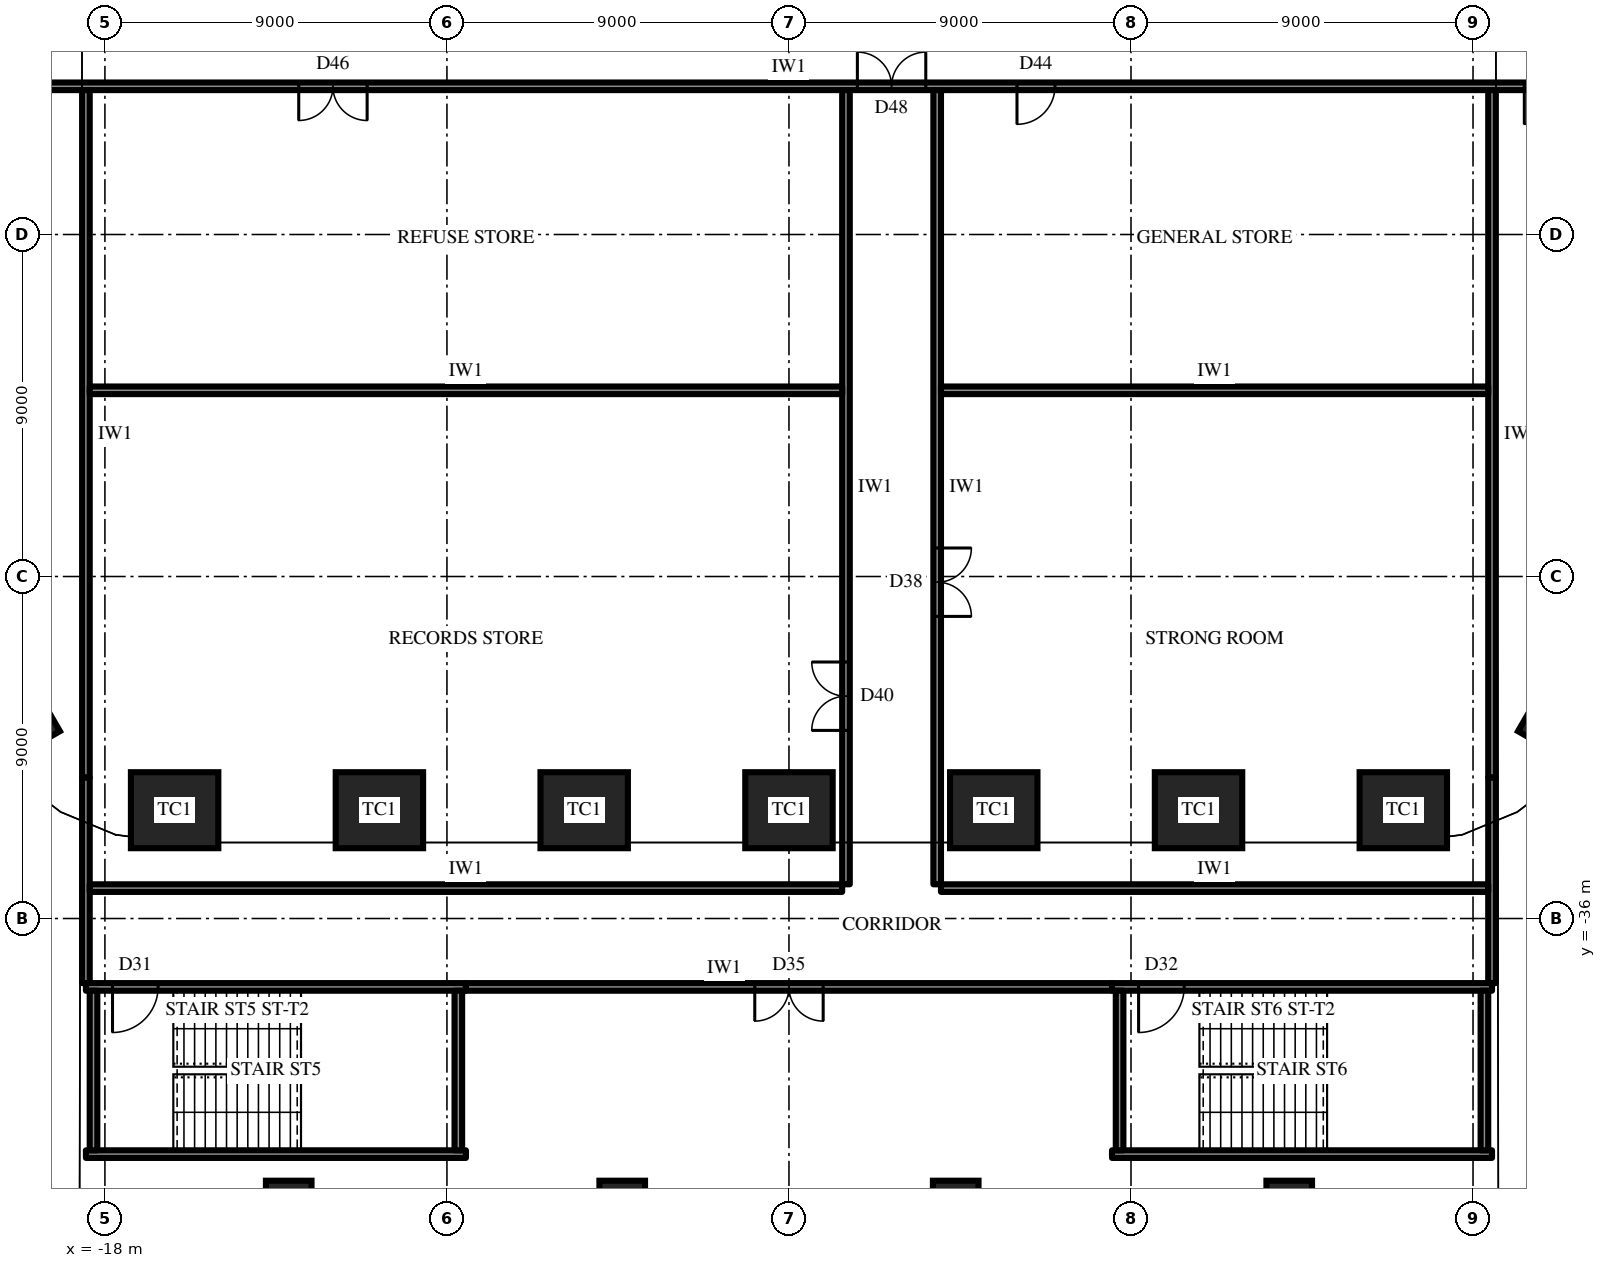
"""IFC4 building model, lengths in metres.
Left out: names, types, materials, properties, quantities, classifications, styles, units other than length and angle.
Written with IfcOpenShell. Run it as: python <this file> out.ifc"""

import sys

from ifc_helpers import new_model, si_unit, direction, frame, frame_2d, origin, origin_2d, place, context, subcontext, project, spatial, rectangle, extrude, element, fill, save


model = new_model("IFC4")
c1 = context("Model", 3, precision=1e-05, world=origin(), true_north=direction((0.0, 1.0)))
c2 = subcontext(c1, "Body", "Model", "MODEL_VIEW")
j1 = project(units=[si_unit("LENGTHUNIT", "METRE"), si_unit("PLANEANGLEUNIT", "RADIAN")], contexts=[c1])
p1 = place(None, origin())
s1 = spatial("IfcSite", under=j1, at=p1, CompositionType="ELEMENT")
p2 = place(p1, origin())
s2 = spatial("IfcBuilding", under=s1, at=p2, CompositionType="ELEMENT")
p3 = place(p2, frame((0.0, 0.0, -4.5)))
s3 = spatial("IfcBuildingStorey", under=s2, at=p3, CompositionType="ELEMENT", Elevation=-4.5)
for number, where, z_axis, x_axis in (
    (1, (-20.626, -30.575, 0.0), (0.0, 0.0, 1.0), (0.5, -0.866, 0.0)),
    (2, (-16.166, -33.15, 0.0), (0.0, 0.0, 1.0), (1.0, 0.0, 0.0)),
    (3, (-10.777, -33.15, 0.0), (0.0, 0.0, 1.0), (1.0, 0.0, 0.0)),
    (4, (-5.389, -33.15, 0.0), (0.0, 0.0, 1.0), (1.0, 0.0, 0.0)),
    (5, (0.0, -33.15, 0.0), (0.0, 0.0, 1.0), (1.0, 0.0, 0.0)),
    (6, (5.389, -33.15, 0.0), (0.0, 0.0, 1.0), (1.0, 0.0, 0.0)),
    (7, (10.777, -33.15, 0.0), (0.0, 0.0, 1.0), (1.0, 0.0, 0.0)),
    (8, (16.166, -33.15, 0.0), (0.0, 0.0, 1.0), (1.0, 0.0, 0.0)),
    (9, (20.626, -30.575, 0.0), (0.0, 0.0, 1.0), (0.5, 0.866, 0.0)),
):
    element("IfcColumn", number, at=place(p3, frame(where, z_axis=z_axis, x_axis=x_axis)), inside=s3, PredefinedType="COLUMN", context=c2, shape_type="SweptSolid", body=[
        extrude(rectangle(XDim=2.3, YDim=2.0, at=origin_2d()), origin(), (0.0, 0.0, 1.0), 4.5),
    ])
p4 = place(p3, frame((-18.5, -42.2, 0.0), z_axis=(0.0, 0.0, 1.0), x_axis=(1.0, 0.0, 0.0)))
e10 = element("IfcWall", 10, at=p4, inside=s3, PredefinedType="SHEAR", context=c2, shape_type="SweptSolid", body=[
    extrude(rectangle(XDim=10.0, YDim=0.2, at=frame_2d((5.0, 0.0))), origin(), (0.0, 0.0, 1.0), 4.5),
])
p5 = place(p3, frame((-8.5, -37.8, 0.0), z_axis=(0.0, 0.0, 1.0), x_axis=(-1.0, 0.0, 0.0)))
e11 = element("IfcWall", 11, at=p5, inside=s3, PredefinedType="SHEAR", context=c2, shape_type="SweptSolid", body=[
    extrude(rectangle(XDim=10.0, YDim=0.2, at=frame_2d((5.0, 0.0))), origin(), (0.0, 0.0, 1.0), 4.5),
])
p6 = place(p5, frame((8.1, 0.0, 0.0)))
e12 = element("IfcOpeningElement", 12, at=p6, cuts=e11, PredefinedType="OPENING", context=c2, shape_type="SweptSolid", body=[
    extrude(rectangle(XDim=1.2, YDim=2.2, at=frame_2d((0.6, 1.1))), frame((0.0, 0.11, 0.0), z_axis=(0.0, -1.0, 0.0), x_axis=(1.0, 0.0, 0.0)), (0.0, 0.0, 1.0), 0.22),
])
for number, where, z_axis, x_axis in (
    (13, (-18.3, -37.9, 0.0), (0.0, 0.0, 1.0), (0.0, -1.0, 0.0)),
    (14, (-8.7, -42.1, 0.0), (0.0, 0.0, 1.0), (0.0, 1.0, 0.0)),
):
    element("IfcWall", number, at=place(p3, frame(where, z_axis=z_axis, x_axis=x_axis)), inside=s3, PredefinedType="SHEAR", context=c2, shape_type="SweptSolid", body=[
        extrude(rectangle(XDim=4.2, YDim=0.2, at=frame_2d((2.1, 0.0))), origin(), (0.0, 0.0, 1.0), 4.5),
    ])
p7 = place(p3, frame((8.5, -42.2, 0.0), z_axis=(0.0, 0.0, 1.0), x_axis=(1.0, 0.0, 0.0)))
e15 = element("IfcWall", 15, at=p7, inside=s3, PredefinedType="SHEAR", context=c2, shape_type="SweptSolid", body=[
    extrude(rectangle(XDim=10.0, YDim=0.2, at=frame_2d((5.0, 0.0))), origin(), (0.0, 0.0, 1.0), 4.5),
])
p8 = place(p3, frame((18.5, -37.8, 0.0), z_axis=(0.0, 0.0, 1.0), x_axis=(-1.0, 0.0, 0.0)))
e16 = element("IfcWall", 16, at=p8, inside=s3, PredefinedType="SHEAR", context=c2, shape_type="SweptSolid", body=[
    extrude(rectangle(XDim=10.0, YDim=0.2, at=frame_2d((5.0, 0.0))), origin(), (0.0, 0.0, 1.0), 4.5),
])
p9 = place(p8, frame((8.1, 0.0, 0.0)))
e17 = element("IfcOpeningElement", 17, at=p9, cuts=e16, PredefinedType="OPENING", context=c2, shape_type="SweptSolid", body=[
    extrude(rectangle(XDim=1.2, YDim=2.2, at=frame_2d((0.6, 1.1))), frame((0.0, 0.11, 0.0), z_axis=(0.0, -1.0, 0.0), x_axis=(1.0, 0.0, 0.0)), (0.0, 0.0, 1.0), 0.22),
])
for number, where, z_axis, x_axis in (
    (18, (8.7, -37.9, 0.0), (0.0, 0.0, 1.0), (0.0, -1.0, 0.0)),
    (19, (18.3, -42.1, 0.0), (0.0, 0.0, 1.0), (0.0, 1.0, 0.0)),
):
    element("IfcWall", number, at=place(p3, frame(where, z_axis=z_axis, x_axis=x_axis)), inside=s3, PredefinedType="SHEAR", context=c2, shape_type="SweptSolid", body=[
        extrude(rectangle(XDim=4.2, YDim=0.2, at=frame_2d((2.1, 0.0))), origin(), (0.0, 0.0, 1.0), 4.5),
    ])
for number, where, z_axis, x_axis in (
    (20, (-13.164, -43.5, 0.0), (0.0, 0.0, 1.0), (1.0, 0.0, 0.0)),
    (21, (-4.388, -43.5, 0.0), (0.0, 0.0, 1.0), (1.0, 0.0, 0.0)),
    (22, (4.388, -43.5, 0.0), (0.0, 0.0, 1.0), (1.0, 0.0, 0.0)),
    (23, (13.164, -43.5, 0.0), (0.0, 0.0, 1.0), (1.0, 0.0, 0.0)),
):
    element("IfcColumn", number, at=place(p3, frame(where, z_axis=z_axis, x_axis=x_axis)), inside=s3, PredefinedType="COLUMN", context=c2, shape_type="SweptSolid", body=[
        extrude(rectangle(XDim=1.2, YDim=1.2, at=origin_2d()), origin(), (0.0, 0.0, 1.0), 4.5),
    ])
p10 = place(p3, frame((-44.283, -14.1, 0.0), z_axis=(0.0, 0.0, 1.0), x_axis=(1.0, 0.0, 0.0)))
e24 = element("IfcWall", 24, at=p10, inside=s3, PredefinedType="PARTITIONING", context=c2, shape_type="SweptSolid", body=[
    extrude(rectangle(XDim=88.565, YDim=0.2, at=frame_2d((44.283, 0.0))), origin(), (0.0, 0.0, 1.0), 4.15),
])
p11 = place(p10, frame((31.383, 0.0, 0.0)))
e25 = element("IfcOpeningElement", 25, at=p11, cuts=e24, PredefinedType="OPENING", context=c2, shape_type="SweptSolid", body=[
    extrude(rectangle(XDim=1.8, YDim=2.4, at=frame_2d((0.9, 1.2))), frame((0.0, 0.11, 0.0), z_axis=(0.0, -1.0, 0.0), x_axis=(1.0, 0.0, 0.0)), (0.0, 0.0, 1.0), 0.22),
])
p12 = place(p10, frame((50.283, 0.0, 0.0)))
e26 = element("IfcOpeningElement", 26, at=p12, cuts=e24, PredefinedType="OPENING", context=c2, shape_type="SweptSolid", body=[
    extrude(rectangle(XDim=1.0, YDim=2.2, at=frame_2d((0.5, 1.1))), frame((0.0, 0.11, 0.0), z_axis=(0.0, -1.0, 0.0), x_axis=(1.0, 0.0, 0.0)), (0.0, 0.0, 1.0), 0.22),
])
p13 = place(p10, frame((46.083, 0.0, 0.0)))
e27 = element("IfcOpeningElement", 27, at=p13, cuts=e24, PredefinedType="OPENING", context=c2, shape_type="SweptSolid", body=[
    extrude(rectangle(XDim=1.8, YDim=2.4, at=frame_2d((0.9, 1.2))), frame((0.0, 0.11, 0.0), z_axis=(0.0, -1.0, 0.0), x_axis=(1.0, 0.0, 0.0)), (0.0, 0.0, 1.0), 0.22),
])
p14 = place(p10, frame((63.633, 0.0, 0.0)))
e28 = element("IfcOpeningElement", 28, at=p14, cuts=e24, PredefinedType="OPENING", context=c2, shape_type="SweptSolid", body=[
    extrude(rectangle(XDim=1.0, YDim=2.2, at=frame_2d((0.5, 1.1))), frame((0.0, 0.11, 0.0), z_axis=(0.0, -1.0, 0.0), x_axis=(1.0, 0.0, 0.0)), (0.0, 0.0, 1.0), 0.22),
])
p15 = place(p3, frame((-18.5, -14.2, 0.0), z_axis=(0.0, 0.0, 1.0), x_axis=(0.0, -1.0, 0.0)))
e29 = element("IfcWall", 29, at=p15, inside=s3, PredefinedType="PARTITIONING", context=c2, shape_type="SweptSolid", body=[
    extrude(rectangle(XDim=18.09, YDim=0.2, at=frame_2d((9.045, 0.0))), origin(), (0.0, 0.0, 1.0), 3.094),
])
p16 = place(p3, frame((-18.5, -32.29, 0.0), z_axis=(0.0, 0.0, 1.0), x_axis=(0.0, -1.0, 0.0)))
e30 = element("IfcWall", 30, at=p16, inside=s3, PredefinedType="PARTITIONING", context=c2, shape_type="SweptSolid", body=[
    extrude(rectangle(XDim=5.41, YDim=0.2, at=frame_2d((2.705, 0.0))), origin(), (0.0, 0.0, 1.0), 4.15),
])
p17 = place(p3, frame((18.5, -14.2, 0.0), z_axis=(0.0, 0.0, 1.0), x_axis=(0.0, -1.0, 0.0)))
e31 = element("IfcWall", 31, at=p17, inside=s3, PredefinedType="PARTITIONING", context=c2, shape_type="SweptSolid", body=[
    extrude(rectangle(XDim=18.09, YDim=0.2, at=frame_2d((9.045, 0.0))), origin(), (0.0, 0.0, 1.0), 3.094),
])
p18 = place(p3, frame((18.5, -32.29, 0.0), z_axis=(0.0, 0.0, 1.0), x_axis=(0.0, -1.0, 0.0)))
e32 = element("IfcWall", 32, at=p18, inside=s3, PredefinedType="PARTITIONING", context=c2, shape_type="SweptSolid", body=[
    extrude(rectangle(XDim=5.41, YDim=0.2, at=frame_2d((2.705, 0.0))), origin(), (0.0, 0.0, 1.0), 4.15),
])
p19 = place(p3, frame((1.5, -14.2, 0.0), z_axis=(0.0, 0.0, 1.0), x_axis=(0.0, -1.0, 0.0)))
e33 = element("IfcWall", 33, at=p19, inside=s3, PredefinedType="PARTITIONING", context=c2, shape_type="SweptSolid", body=[
    extrude(rectangle(XDim=20.9, YDim=0.2, at=frame_2d((10.45, 0.0))), origin(), (0.0, 0.0, 1.0), 4.15),
])
p20 = place(p19, frame((15.05, 0.0, 0.0)))
e34 = element("IfcOpeningElement", 34, at=p20, cuts=e33, PredefinedType="OPENING", context=c2, shape_type="SweptSolid", body=[
    extrude(rectangle(XDim=1.8, YDim=2.4, at=frame_2d((0.9, 1.2))), frame((0.0, 0.11, 0.0), z_axis=(0.0, -1.0, 0.0), x_axis=(1.0, 0.0, 0.0)), (0.0, 0.0, 1.0), 0.22),
])
p21 = place(p3, frame((3.9, -14.2, 0.0), z_axis=(0.0, 0.0, 1.0), x_axis=(0.0, -1.0, 0.0)))
e35 = element("IfcWall", 35, at=p21, inside=s3, PredefinedType="PARTITIONING", context=c2, shape_type="SweptSolid", body=[
    extrude(rectangle(XDim=20.9, YDim=0.2, at=frame_2d((10.45, 0.0))), origin(), (0.0, 0.0, 1.0), 4.15),
])
p22 = place(p21, frame((12.05, 0.0, 0.0)))
e36 = element("IfcOpeningElement", 36, at=p22, cuts=e35, PredefinedType="OPENING", context=c2, shape_type="SweptSolid", body=[
    extrude(rectangle(XDim=1.8, YDim=2.4, at=frame_2d((0.9, 1.2))), frame((0.0, 0.11, 0.0), z_axis=(0.0, -1.0, 0.0), x_axis=(1.0, 0.0, 0.0)), (0.0, 0.0, 1.0), 0.22),
])
p23 = place(p3, frame((-18.4, -22.1, 0.0), z_axis=(0.0, 0.0, 1.0), x_axis=(1.0, 0.0, 0.0)))
e37 = element("IfcWall", 37, at=p23, inside=s3, PredefinedType="PARTITIONING", context=c2, shape_type="SweptSolid", body=[
    extrude(rectangle(XDim=19.8, YDim=0.2, at=frame_2d((9.9, 0.0))), origin(), (0.0, 0.0, 1.0), 4.15),
])
p24 = place(p3, frame((4.0, -22.1, 0.0), z_axis=(0.0, 0.0, 1.0), x_axis=(1.0, 0.0, 0.0)))
e38 = element("IfcWall", 38, at=p24, inside=s3, PredefinedType="PARTITIONING", context=c2, shape_type="SweptSolid", body=[
    extrude(rectangle(XDim=14.4, YDim=0.2, at=frame_2d((7.2, 0.0))), origin(), (0.0, 0.0, 1.0), 4.15),
])
p25 = place(p3, frame((-18.4, -35.2, 0.0), z_axis=(0.0, 0.0, 1.0), x_axis=(1.0, 0.0, 0.0)))
e39 = element("IfcWall", 39, at=p25, inside=s3, PredefinedType="PARTITIONING", context=c2, shape_type="SweptSolid", body=[
    extrude(rectangle(XDim=19.8, YDim=0.2, at=frame_2d((9.9, 0.0))), origin(), (0.0, 0.0, 1.0), 4.15),
])
p26 = place(p3, frame((4.0, -35.2, 0.0), z_axis=(0.0, 0.0, 1.0), x_axis=(1.0, 0.0, 0.0)))
e40 = element("IfcWall", 40, at=p26, inside=s3, PredefinedType="PARTITIONING", context=c2, shape_type="SweptSolid", body=[
    extrude(rectangle(XDim=14.4, YDim=0.2, at=frame_2d((7.2, 0.0))), origin(), (0.0, 0.0, 1.0), 4.15),
])
p27 = place(p3, frame((-8.5, -37.8, 0.0), z_axis=(0.0, 0.0, 1.0), x_axis=(1.0, 0.0, 0.0)))
e41 = element("IfcWall", 41, at=p27, inside=s3, PredefinedType="PARTITIONING", context=c2, shape_type="SweptSolid", body=[
    extrude(rectangle(XDim=17.0, YDim=0.2, at=frame_2d((8.5, 0.0))), origin(), (0.0, 0.0, 1.0), 4.15),
])
p28 = place(p27, frame((7.6, 0.0, 0.0)))
e42 = element("IfcOpeningElement", 42, at=p28, cuts=e41, PredefinedType="OPENING", context=c2, shape_type="SweptSolid", body=[
    extrude(rectangle(XDim=1.8, YDim=2.4, at=frame_2d((0.9, 1.2))), frame((0.0, 0.11, 0.0), z_axis=(0.0, -1.0, 0.0), x_axis=(1.0, 0.0, 0.0)), (0.0, 0.0, 1.0), 0.22),
])
p29 = place(p11, frame((1.8, 0.0, 0.0), z_axis=(0.0, 0.0, 1.0), x_axis=(-1.0, 0.0, 0.0)))
e43 = element("IfcDoor", 43, at=p29, inside=s3, OperationType="DOUBLE_DOOR_SINGLE_SWING", PredefinedType="DOOR", context=c2, shape_type="SweptSolid", body=[
    extrude(rectangle(XDim=1.8, YDim=2.4, at=frame_2d((0.9, 1.2))), frame((0.0, 0.025, 0.0), z_axis=(0.0, -1.0, 0.0), x_axis=(1.0, 0.0, 0.0)), (0.0, 0.0, 1.0), 0.05),
])
fill(e25, e43)
p30 = place(p12, frame((1.0, 0.0, 0.0), z_axis=(0.0, 0.0, 1.0), x_axis=(-1.0, 0.0, 0.0)))
e44 = element("IfcDoor", 44, at=p30, inside=s3, OperationType="SINGLE_SWING_LEFT", PredefinedType="DOOR", context=c2, shape_type="SweptSolid", body=[
    extrude(rectangle(XDim=1.0, YDim=2.2, at=frame_2d((0.5, 1.1))), frame((0.0, 0.025, 0.0), z_axis=(0.0, -1.0, 0.0), x_axis=(1.0, 0.0, 0.0)), (0.0, 0.0, 1.0), 0.05),
])
fill(e26, e44)
p31 = place(p13, origin())
e45 = element("IfcDoor", 45, at=p31, inside=s3, OperationType="DOUBLE_DOOR_SINGLE_SWING", PredefinedType="DOOR", context=c2, shape_type="SweptSolid", body=[
    extrude(rectangle(XDim=1.8, YDim=2.4, at=frame_2d((0.9, 1.2))), frame((0.0, 0.025, 0.0), z_axis=(0.0, -1.0, 0.0), x_axis=(1.0, 0.0, 0.0)), (0.0, 0.0, 1.0), 0.05),
])
fill(e27, e45)
p32 = place(p20, frame((1.8, 0.0, 0.0), z_axis=(0.0, 0.0, 1.0), x_axis=(-1.0, 0.0, 0.0)))
e46 = element("IfcDoor", 46, at=p32, inside=s3, OperationType="DOUBLE_DOOR_SINGLE_SWING", PredefinedType="DOOR", context=c2, shape_type="SweptSolid", body=[
    extrude(rectangle(XDim=1.8, YDim=2.4, at=frame_2d((0.9, 1.2))), frame((0.0, 0.025, 0.0), z_axis=(0.0, -1.0, 0.0), x_axis=(1.0, 0.0, 0.0)), (0.0, 0.0, 1.0), 0.05),
])
fill(e34, e46)
p33 = place(p22, origin())
e47 = element("IfcDoor", 47, at=p33, inside=s3, OperationType="DOUBLE_DOOR_SINGLE_SWING", PredefinedType="DOOR", context=c2, shape_type="SweptSolid", body=[
    extrude(rectangle(XDim=1.8, YDim=2.4, at=frame_2d((0.9, 1.2))), frame((0.0, 0.025, 0.0), z_axis=(0.0, -1.0, 0.0), x_axis=(1.0, 0.0, 0.0)), (0.0, 0.0, 1.0), 0.05),
])
fill(e36, e47)
p34 = place(p28, frame((1.8, 0.0, 0.0), z_axis=(0.0, 0.0, 1.0), x_axis=(-1.0, 0.0, 0.0)))
e48 = element("IfcDoor", 48, at=p34, inside=s3, OperationType="DOUBLE_DOOR_SINGLE_SWING", PredefinedType="DOOR", context=c2, shape_type="SweptSolid", body=[
    extrude(rectangle(XDim=1.8, YDim=2.4, at=frame_2d((0.9, 1.2))), frame((0.0, 0.025, 0.0), z_axis=(0.0, -1.0, 0.0), x_axis=(1.0, 0.0, 0.0)), (0.0, 0.0, 1.0), 0.05),
])
fill(e42, e48)
p35 = place(p14, frame((1.0, 0.0, 0.0), z_axis=(0.0, 0.0, 1.0), x_axis=(-1.0, 0.0, 0.0)))
e49 = element("IfcDoor", 49, at=p35, inside=s3, OperationType="SINGLE_SWING_LEFT", PredefinedType="DOOR", context=c2, shape_type="SweptSolid", body=[
    extrude(rectangle(XDim=1.0, YDim=2.2, at=frame_2d((0.5, 1.1))), frame((0.0, 0.025, 0.0), z_axis=(0.0, -1.0, 0.0), x_axis=(1.0, 0.0, 0.0)), (0.0, 0.0, 1.0), 0.05),
])
fill(e28, e49)
p36 = place(p6, origin())
e50 = element("IfcDoor", 50, at=p36, inside=s3, OperationType="SINGLE_SWING_LEFT", PredefinedType="DOOR", context=c2, shape_type="SweptSolid", body=[
    extrude(rectangle(XDim=1.2, YDim=2.2, at=frame_2d((0.6, 1.1))), frame((0.0, 0.025, 0.0), z_axis=(0.0, -1.0, 0.0), x_axis=(1.0, 0.0, 0.0)), (0.0, 0.0, 1.0), 0.05),
])
fill(e12, e50)
p37 = place(p9, origin())
e51 = element("IfcDoor", 51, at=p37, inside=s3, OperationType="SINGLE_SWING_LEFT", PredefinedType="DOOR", context=c2, shape_type="SweptSolid", body=[
    extrude(rectangle(XDim=1.2, YDim=2.2, at=frame_2d((0.6, 1.1))), frame((0.0, 0.025, 0.0), z_axis=(0.0, -1.0, 0.0), x_axis=(1.0, 0.0, 0.0)), (0.0, 0.0, 1.0), 0.05),
])
fill(e17, e51)
save(model, sys.argv[1])
